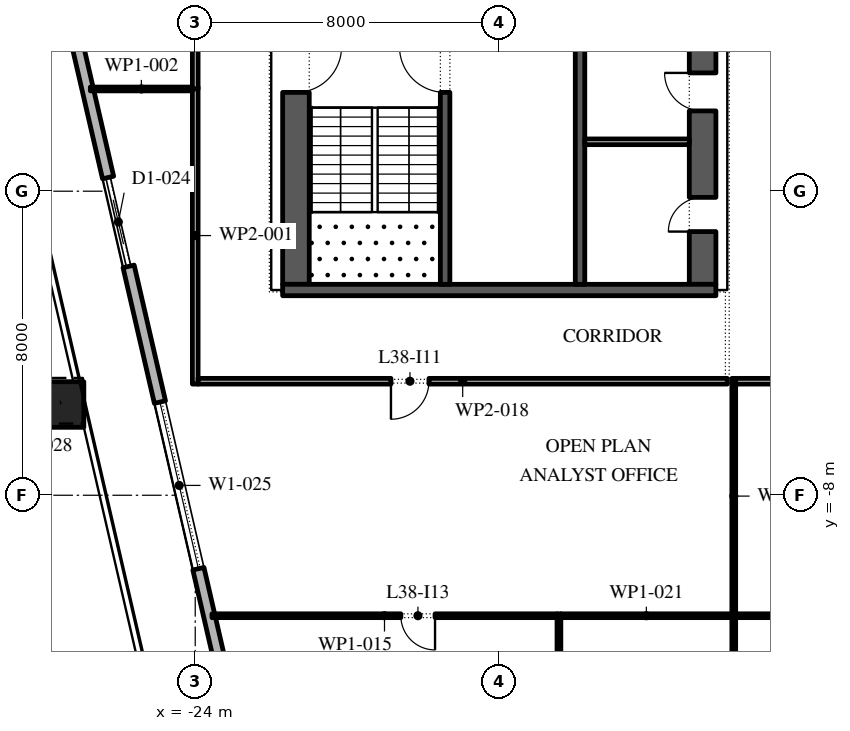
"""IFC4 building model, lengths in metres.
Left out: names, types, materials, properties, quantities, classifications, styles, units other than length and angle.
Written with IfcOpenShell. Run it as: python <this file> out.ifc"""

import sys

from ifc_helpers import new_model, si_unit, direction, frame, frame_2d, origin, origin_2d, place, context, subcontext, project, spatial, rectangle, extrude, element, fill, save


model = new_model("IFC4")
c1 = context("Model", 3, precision=1e-05, world=origin(), true_north=direction((0.0, 1.0)))
c2 = subcontext(c1, "Body", "Model", "MODEL_VIEW")
j1 = project(units=[si_unit("LENGTHUNIT", "METRE"), si_unit("PLANEANGLEUNIT", "RADIAN")], contexts=[c1])
p1 = place(None, origin())
s1 = spatial("IfcSite", under=j1, at=p1, CompositionType="ELEMENT")
p2 = place(p1, origin())
s2 = spatial("IfcBuilding", under=s1, at=p2, CompositionType="ELEMENT")
p3 = place(p2, frame((0.0, 0.0, 175.8)))
s3 = spatial("IfcBuildingStorey", under=s2, at=p3, CompositionType="ELEMENT", Elevation=175.8)
p4 = place(p3, frame((-27.531, -5.613, 0.0), z_axis=(-0.005404472139, 0.023419379268, 0.999711120452), x_axis=(-0.974391195695, -0.224859506699, 0.0)))
e1 = element("IfcColumn", 1, at=p4, inside=s3, PredefinedType="COLUMN", context=c2, shape_type="SweptSolid", body=[
    extrude(rectangle(XDim=1.2, YDim=1.2, at=origin_2d()), origin(), (0.0, 0.0, 1.0), 4.201),
])
p5 = place(p3, frame((-17.592, -20.657, 0.0), z_axis=(0.0, 0.0, 1.0), x_axis=(0.974370243697, 0.224950279389, 0.0)))
e2 = element("IfcWall", 2, at=p5, inside=s3, PredefinedType="STANDARD", context=c2, shape_type="SweptSolid", body=[
    extrude(rectangle(XDim=49.5, YDim=0.3, at=frame_2d((24.75, 0.0))), origin(), (0.0, 0.0, 1.0), 4.0),
])
p6 = place(p5, frame((3.6, 0.0, 0.0)))
e3 = element("IfcOpeningElement", 3, at=p6, cuts=e2, PredefinedType="OPENING", context=c2, shape_type="SweptSolid", body=[
    extrude(rectangle(XDim=2.4, YDim=3.5, at=frame_2d((1.2, 1.75))), frame((0.0, 0.16, 0.0), z_axis=(0.0, -1.0, 0.0), x_axis=(1.0, 0.0, 0.0)), (0.0, 0.0, 1.0), 0.32),
])
p7 = place(p5, frame((9.9, 0.0, 0.45)))
e4 = element("IfcOpeningElement", 4, at=p7, cuts=e2, PredefinedType="OPENING", context=c2, shape_type="SweptSolid", body=[
    extrude(rectangle(XDim=4.5, YDim=2.575, at=frame_2d((2.25, 1.288))), frame((0.0, 0.16, 0.0), z_axis=(0.0, -1.0, 0.0), x_axis=(1.0, 0.0, 0.0)), (0.0, 0.0, 1.0), 0.32),
])
p8 = place(p5, frame((18.2, 0.0, 0.45)))
e5 = element("IfcOpeningElement", 5, at=p8, cuts=e2, PredefinedType="OPENING", context=c2, shape_type="SweptSolid", body=[
    extrude(rectangle(XDim=4.5, YDim=3.05, at=frame_2d((2.25, 1.525))), frame((0.0, 0.16, 0.0), z_axis=(0.0, -1.0, 0.0), x_axis=(1.0, 0.0, 0.0)), (0.0, 0.0, 1.0), 0.32),
])
p9 = place(p5, frame((26.5, 0.0, 0.45)))
e6 = element("IfcOpeningElement", 6, at=p9, cuts=e2, PredefinedType="OPENING", context=c2, shape_type="SweptSolid", body=[
    extrude(rectangle(XDim=4.5, YDim=2.75, at=frame_2d((2.25, 1.375))), frame((0.0, 0.16, 0.0), z_axis=(0.0, -1.0, 0.0), x_axis=(1.0, 0.0, 0.0)), (0.0, 0.0, 1.0), 0.32),
])
p10 = place(p5, frame((36.8, 0.0, 0.0)))
e7 = element("IfcOpeningElement", 7, at=p10, cuts=e2, PredefinedType="OPENING", context=c2, shape_type="SweptSolid", body=[
    extrude(rectangle(XDim=2.4, YDim=3.275, at=frame_2d((1.2, 1.637))), frame((0.0, 0.16, 0.0), z_axis=(0.0, -1.0, 0.0), x_axis=(1.0, 0.0, 0.0)), (0.0, 0.0, 1.0), 0.32),
])
p11 = place(p5, frame((43.1, 0.0, 0.45)))
e8 = element("IfcOpeningElement", 8, at=p11, cuts=e2, PredefinedType="OPENING", context=c2, shape_type="SweptSolid", body=[
    extrude(rectangle(XDim=4.5, YDim=2.875, at=frame_2d((2.25, 1.438))), frame((0.0, 0.16, 0.0), z_axis=(0.0, -1.0, 0.0), x_axis=(1.0, 0.0, 0.0)), (0.0, 0.0, 1.0), 0.32),
])
p12 = place(p3, frame((-33.157, 30.092, 0.0), z_axis=(0.0, 0.0, 1.0), x_axis=(0.224950279389, -0.974370243697, 0.0)))
e9 = element("IfcWall", 9, at=p12, inside=s3, PredefinedType="STANDARD", context=c2, shape_type="SweptSolid", body=[
    extrude(rectangle(XDim=49.5, YDim=0.3, at=frame_2d((24.75, 0.0))), origin(), (0.0, 0.0, 1.0), 4.0),
])
p13 = place(p12, frame((2.207, 0.0, 0.0)))
e10 = element("IfcOpeningElement", 10, at=p13, cuts=e9, PredefinedType="OPENING", context=c2, shape_type="SweptSolid", body=[
    extrude(rectangle(XDim=2.4, YDim=3.5, at=frame_2d((1.2, 1.75))), frame((0.0, 0.16, 0.0), z_axis=(0.0, -1.0, 0.0), x_axis=(1.0, 0.0, 0.0)), (0.0, 0.0, 1.0), 0.32),
])
p14 = place(p12, frame((8.121, 0.0, 0.45)))
e11 = element("IfcOpeningElement", 11, at=p14, cuts=e9, PredefinedType="OPENING", context=c2, shape_type="SweptSolid", body=[
    extrude(rectangle(XDim=4.5, YDim=2.825, at=frame_2d((2.25, 1.413))), frame((0.0, 0.16, 0.0), z_axis=(0.0, -1.0, 0.0), x_axis=(1.0, 0.0, 0.0)), (0.0, 0.0, 1.0), 0.32),
])
p15 = place(p12, frame((15.236, 0.0, 0.45)))
e12 = element("IfcOpeningElement", 12, at=p15, cuts=e9, PredefinedType="OPENING", context=c2, shape_type="SweptSolid", body=[
    extrude(rectangle(XDim=4.5, YDim=2.95, at=frame_2d((2.25, 1.475))), frame((0.0, 0.16, 0.0), z_axis=(0.0, -1.0, 0.0), x_axis=(1.0, 0.0, 0.0)), (0.0, 0.0, 1.0), 0.32),
])
p16 = place(p12, frame((22.35, 0.0, 0.45)))
e13 = element("IfcOpeningElement", 13, at=p16, cuts=e9, PredefinedType="OPENING", context=c2, shape_type="SweptSolid", body=[
    extrude(rectangle(XDim=4.5, YDim=3.0, at=frame_2d((2.25, 1.5))), frame((0.0, 0.16, 0.0), z_axis=(0.0, -1.0, 0.0), x_axis=(1.0, 0.0, 0.0)), (0.0, 0.0, 1.0), 0.32),
])
p17 = place(p12, frame((30.514, 0.0, 0.0)))
e14 = element("IfcOpeningElement", 14, at=p17, cuts=e9, PredefinedType="OPENING", context=c2, shape_type="SweptSolid", body=[
    extrude(rectangle(XDim=2.4, YDim=3.5, at=frame_2d((1.2, 1.75))), frame((0.0, 0.16, 0.0), z_axis=(0.0, -1.0, 0.0), x_axis=(1.0, 0.0, 0.0)), (0.0, 0.0, 1.0), 0.32),
])
p18 = place(p12, frame((36.579, 0.0, 0.45)))
e15 = element("IfcOpeningElement", 15, at=p18, cuts=e9, PredefinedType="OPENING", context=c2, shape_type="SweptSolid", body=[
    extrude(rectangle(XDim=4.5, YDim=3.05, at=frame_2d((2.25, 1.525))), frame((0.0, 0.16, 0.0), z_axis=(0.0, -1.0, 0.0), x_axis=(1.0, 0.0, 0.0)), (0.0, 0.0, 1.0), 0.32),
])
p19 = place(p12, frame((43.693, 0.0, 0.45)))
e16 = element("IfcOpeningElement", 16, at=p19, cuts=e9, PredefinedType="OPENING", context=c2, shape_type="SweptSolid", body=[
    extrude(rectangle(XDim=4.5, YDim=3.05, at=frame_2d((2.25, 1.525))), frame((0.0, 0.16, 0.0), z_axis=(0.0, -1.0, 0.0), x_axis=(1.0, 0.0, 0.0)), (0.0, 0.0, 1.0), 0.32),
])
p20 = place(p3, frame((-21.35, -2.45, 0.0), z_axis=(0.0, 0.0, 1.0), x_axis=(0.0, 1.0, 0.0)))
e17 = element("IfcWall", 17, at=p20, inside=s3, PredefinedType="SHEAR", context=c2, shape_type="SweptSolid", body=[
    extrude(rectangle(XDim=27.9, YDim=0.7, at=frame_2d((13.95, 0.0))), origin(), (0.0, 0.0, 1.0), 4.0),
])
p21 = place(p20, frame((5.05, 0.0, 0.0)))
e18 = element("IfcOpeningElement", 18, at=p21, cuts=e17, PredefinedType="OPENING", context=c2, shape_type="SweptSolid", body=[
    extrude(rectangle(XDim=1.2, YDim=2.1, at=frame_2d((0.6, 1.05))), frame((0.0, 0.36, 0.0), z_axis=(0.0, -1.0, 0.0), x_axis=(1.0, 0.0, 0.0)), (0.0, 0.0, 1.0), 0.72),
])
p22 = place(p20, frame((21.65, 0.0, 0.0)))
e19 = element("IfcOpeningElement", 19, at=p22, cuts=e17, PredefinedType="OPENING", context=c2, shape_type="SweptSolid", body=[
    extrude(rectangle(XDim=1.2, YDim=2.1, at=frame_2d((0.6, 1.05))), frame((0.0, 0.36, 0.0), z_axis=(0.0, -1.0, 0.0), x_axis=(1.0, 0.0, 0.0)), (0.0, 0.0, 1.0), 0.72),
])
p23 = place(p3, frame((-10.65, -2.45, 0.0), z_axis=(0.0, 0.0, 1.0), x_axis=(0.0, 1.0, 0.0)))
e20 = element("IfcWall", 20, at=p23, inside=s3, PredefinedType="SHEAR", context=c2, shape_type="SweptSolid", body=[
    extrude(rectangle(XDim=27.9, YDim=0.7, at=frame_2d((13.95, 0.0))), origin(), (0.0, 0.0, 1.0), 4.0),
])
p24 = place(p23, frame((23.65, 0.0, 0.0)))
e21 = element("IfcOpeningElement", 21, at=p24, cuts=e20, PredefinedType="OPENING", context=c2, shape_type="SweptSolid", body=[
    extrude(rectangle(XDim=2.4, YDim=2.1, at=frame_2d((1.2, 1.05))), frame((0.0, 0.36, 0.0), z_axis=(0.0, -1.0, 0.0), x_axis=(1.0, 0.0, 0.0)), (0.0, 0.0, 1.0), 0.72),
])
p25 = place(p23, frame((1.387, 0.0, 0.0)))
e22 = element("IfcOpeningElement", 22, at=p25, cuts=e20, PredefinedType="OPENING", context=c2, shape_type="SweptSolid", body=[
    extrude(rectangle(XDim=0.9, YDim=2.1, at=frame_2d((0.45, 1.05))), frame((0.0, 0.36, 0.0), z_axis=(0.0, -1.0, 0.0), x_axis=(1.0, 0.0, 0.0)), (0.0, 0.0, 1.0), 0.72),
])
p26 = place(p23, frame((4.562, 0.0, 0.0)))
e23 = element("IfcOpeningElement", 23, at=p26, cuts=e20, PredefinedType="OPENING", context=c2, shape_type="SweptSolid", body=[
    extrude(rectangle(XDim=1.0, YDim=2.1, at=frame_2d((0.5, 1.05))), frame((0.0, 0.36, 0.0), z_axis=(0.0, -1.0, 0.0), x_axis=(1.0, 0.0, 0.0)), (0.0, 0.0, 1.0), 0.72),
])
p27 = place(p3, frame((-21.7, -2.6, 0.0), z_axis=(0.0, 0.0, 1.0), x_axis=(1.0, 0.0, 0.0)))
e24 = element("IfcWall", 24, at=p27, inside=s3, PredefinedType="SHEAR", context=c2, shape_type="SweptSolid", body=[
    extrude(rectangle(XDim=11.4, YDim=0.3, at=frame_2d((5.7, 0.0))), origin(), (0.0, 0.0, 1.0), 4.0),
])
p28 = place(p3, frame((-17.425, -2.45, 0.0), z_axis=(0.0, 0.0, 1.0), x_axis=(0.0, 1.0, 0.0)))
e25 = element("IfcWall", 25, at=p28, inside=s3, PredefinedType="SHEAR", context=c2, shape_type="SweptSolid", body=[
    extrude(rectangle(XDim=6.3, YDim=0.25, at=frame_2d((3.15, 0.0))), origin(), (0.0, 0.0, 1.0), 4.0),
])
p29 = place(p28, frame((5.05, 0.0, 0.0)))
e26 = element("IfcOpeningElement", 26, at=p29, cuts=e25, PredefinedType="OPENING", context=c2, shape_type="SweptSolid", body=[
    extrude(rectangle(XDim=1.2, YDim=2.1, at=frame_2d((0.6, 1.05))), frame((0.0, 0.135, 0.0), z_axis=(0.0, -1.0, 0.0), x_axis=(1.0, 0.0, 0.0)), (0.0, 0.0, 1.0), 0.27),
])
p30 = place(p3, frame((-13.875, -2.45, 0.0), z_axis=(0.0, 0.0, 1.0), x_axis=(0.0, 1.0, 0.0)))
e27 = element("IfcWall", 27, at=p30, inside=s3, PredefinedType="SHEAR", context=c2, shape_type="SweptSolid", body=[
    extrude(rectangle(XDim=21.3, YDim=0.25, at=frame_2d((10.65, 0.0))), origin(), (0.0, 0.0, 1.0), 4.0),
])
p31 = place(p30, frame((17.786, 0.0, 0.0)))
e28 = element("IfcOpeningElement", 28, at=p31, cuts=e27, PredefinedType="OPENING", context=c2, shape_type="SweptSolid", body=[
    extrude(rectangle(XDim=0.9, YDim=2.1, at=frame_2d((0.45, 1.05))), frame((0.0, 0.135, 0.0), z_axis=(0.0, -1.0, 0.0), x_axis=(1.0, 0.0, 0.0)), (0.0, 0.0, 1.0), 0.27),
])
p32 = place(p30, frame((6.971, 0.0, 0.0)))
e29 = element("IfcOpeningElement", 29, at=p32, cuts=e27, PredefinedType="OPENING", context=c2, shape_type="SweptSolid", body=[
    extrude(rectangle(XDim=1.1, YDim=2.1, at=frame_2d((0.55, 1.05))), frame((0.0, 0.135, 0.0), z_axis=(0.0, -1.0, 0.0), x_axis=(1.0, 0.0, 0.0)), (0.0, 0.0, 1.0), 0.27),
])
p33 = place(p30, frame((9.114, 0.0, 0.0)))
e30 = element("IfcOpeningElement", 30, at=p33, cuts=e27, PredefinedType="OPENING", context=c2, shape_type="SweptSolid", body=[
    extrude(rectangle(XDim=1.1, YDim=2.1, at=frame_2d((0.55, 1.05))), frame((0.0, 0.135, 0.0), z_axis=(0.0, -1.0, 0.0), x_axis=(1.0, 0.0, 0.0)), (0.0, 0.0, 1.0), 0.27),
])
p34 = place(p30, frame((11.257, 0.0, 0.0)))
e31 = element("IfcOpeningElement", 31, at=p34, cuts=e27, PredefinedType="OPENING", context=c2, shape_type="SweptSolid", body=[
    extrude(rectangle(XDim=1.1, YDim=2.1, at=frame_2d((0.55, 1.05))), frame((0.0, 0.135, 0.0), z_axis=(0.0, -1.0, 0.0), x_axis=(1.0, 0.0, 0.0)), (0.0, 0.0, 1.0), 0.27),
])
p35 = place(p30, frame((13.4, 0.0, 0.0)))
e32 = element("IfcOpeningElement", 32, at=p35, cuts=e27, PredefinedType="OPENING", context=c2, shape_type="SweptSolid", body=[
    extrude(rectangle(XDim=1.1, YDim=2.1, at=frame_2d((0.55, 1.05))), frame((0.0, 0.135, 0.0), z_axis=(0.0, -1.0, 0.0), x_axis=(1.0, 0.0, 0.0)), (0.0, 0.0, 1.0), 0.27),
])
p36 = place(p3, frame((-13.75, 1.3, 0.0), z_axis=(0.0, 0.0, 1.0), x_axis=(1.0, 0.0, 0.0)))
e33 = element("IfcWall", 33, at=p36, inside=s3, PredefinedType="PARTITIONING", context=c2, shape_type="SweptSolid", body=[
    extrude(rectangle(XDim=2.75, YDim=0.15, at=frame_2d((1.375, 0.0))), origin(), (0.0, 0.0, 1.0), 4.0),
])
p37 = place(p3, frame((-24.0, -5.075, 0.0), z_axis=(0.0, 0.0, 1.0), x_axis=(0.0, 1.0, 0.0)))
e34 = element("IfcWall", 34, at=p37, inside=s3, PredefinedType="PARTITIONING", context=c2, shape_type="SweptSolid", body=[
    extrude(rectangle(XDim=7.815, YDim=0.15, at=frame_2d((3.907, 0.0))), origin(), (0.0, 0.0, 1.0), 4.0),
])
p38 = place(p3, frame((-24.075, 2.69, 0.0), z_axis=(0.0, 0.0, 1.0), x_axis=(-1.0, 0.0, 0.0)))
e35 = element("IfcWall", 35, at=p38, inside=s3, PredefinedType="PARTITIONING", context=c2, shape_type="SweptSolid", body=[
    extrude(rectangle(XDim=2.685, YDim=0.1, at=frame_2d((1.343, 0.0))), origin(), (0.0, 0.0, 1.0), 4.0),
])
p39 = place(p3, frame((-24.0, 2.69, 0.0), z_axis=(0.0, 0.0, 1.0), x_axis=(0.0, 1.0, 0.0)))
e36 = element("IfcWall", 36, at=p39, inside=s3, PredefinedType="PARTITIONING", context=c2, shape_type="SweptSolid", body=[
    extrude(rectangle(XDim=12.74, YDim=0.15, at=frame_2d((6.37, 0.0))), origin(), (0.0, 0.0, 1.0), 4.0),
])
p40 = place(p39, frame((5.79, 0.0, 0.0)))
e37 = element("IfcOpeningElement", 37, at=p40, cuts=e36, PredefinedType="OPENING", context=c2, shape_type="SweptSolid", body=[
    extrude(rectangle(XDim=1.0, YDim=2.1, at=frame_2d((0.5, 1.05))), frame((0.0, 0.085, 0.0), z_axis=(0.0, -1.0, 0.0), x_axis=(1.0, 0.0, 0.0)), (0.0, 0.0, 1.0), 0.17),
])
p41 = place(p3, frame((-14.43, -19.856, 0.0), z_axis=(0.0, 0.0, 1.0), x_axis=(0.0, 1.0, 0.0)))
e38 = element("IfcWall", 38, at=p41, inside=s3, PredefinedType="PARTITIONING", context=c2, shape_type="SweptSolid", body=[
    extrude(rectangle(XDim=8.736, YDim=0.1, at=frame_2d((4.368, 0.0))), origin(), (0.0, 0.0, 1.0), 4.0),
])
p42 = place(p3, frame((-14.48, -11.17, 0.0), z_axis=(0.0, 0.0, 1.0), x_axis=(-1.0, 0.0, 0.0)))
e39 = element("IfcWall", 39, at=p42, inside=s3, PredefinedType="PARTITIONING", context=c2, shape_type="SweptSolid", body=[
    extrude(rectangle(XDim=9.08, YDim=0.1, at=frame_2d((4.54, 0.0))), origin(), (0.0, 0.0, 1.0), 4.0),
])
p43 = place(p42, frame((3.21, 0.0, 0.0)))
e40 = element("IfcOpeningElement", 40, at=p43, cuts=e39, PredefinedType="OPENING", context=c2, shape_type="SweptSolid", body=[
    extrude(rectangle(XDim=0.9, YDim=2.1, at=frame_2d((0.45, 1.05))), frame((0.0, 0.06, 0.0), z_axis=(0.0, -1.0, 0.0), x_axis=(1.0, 0.0, 0.0)), (0.0, 0.0, 1.0), 0.12),
])
p44 = place(p3, frame((-10.0, -5.0, 0.0), z_axis=(0.0, 0.0, 1.0), x_axis=(-1.0, 0.0, 0.0)))
e41 = element("IfcWall", 41, at=p44, inside=s3, PredefinedType="PARTITIONING", context=c2, shape_type="SweptSolid", body=[
    extrude(rectangle(XDim=13.925, YDim=0.15, at=frame_2d((6.962, 0.0))), origin(), (0.0, 0.0, 1.0), 4.0),
])
p45 = place(p44, frame((7.85, 0.0, 0.0)))
e42 = element("IfcOpeningElement", 42, at=p45, cuts=e41, PredefinedType="OPENING", context=c2, shape_type="SweptSolid", body=[
    extrude(rectangle(XDim=1.0, YDim=2.1, at=frame_2d((0.5, 1.05))), frame((0.0, 0.085, 0.0), z_axis=(0.0, -1.0, 0.0), x_axis=(1.0, 0.0, 0.0)), (0.0, 0.0, 1.0), 0.17),
])
p46 = place(p3, frame((-9.83, -18.794, 0.0), z_axis=(0.0, 0.0, 1.0), x_axis=(0.0, 1.0, 0.0)))
e43 = element("IfcWall", 43, at=p46, inside=s3, PredefinedType="PARTITIONING", context=c2, shape_type="SweptSolid", body=[
    extrude(rectangle(XDim=7.674, YDim=0.1, at=frame_2d((3.837, 0.0))), origin(), (0.0, 0.0, 1.0), 4.0),
])
p47 = place(p46, frame((3.274, 0.0, 0.0)))
e44 = element("IfcOpeningElement", 44, at=p47, cuts=e43, PredefinedType="OPENING", context=c2, shape_type="SweptSolid", body=[
    extrude(rectangle(XDim=0.9, YDim=2.1, at=frame_2d((0.45, 1.05))), frame((0.0, 0.06, 0.0), z_axis=(0.0, -1.0, 0.0), x_axis=(1.0, 0.0, 0.0)), (0.0, 0.0, 1.0), 0.12),
])
p48 = place(p3, frame((-9.88, -11.17, 0.0), z_axis=(0.0, 0.0, 1.0), x_axis=(-1.0, 0.0, 0.0)))
e45 = element("IfcWall", 45, at=p48, inside=s3, PredefinedType="PARTITIONING", context=c2, shape_type="SweptSolid", body=[
    extrude(rectangle(XDim=4.5, YDim=0.1, at=frame_2d((2.25, 0.0))), origin(), (0.0, 0.0, 1.0), 4.0),
])
p49 = place(p3, frame((-9.83, -11.12, 0.0), z_axis=(0.0, 0.0, 1.0), x_axis=(0.0, 1.0, 0.0)))
e46 = element("IfcWall", 46, at=p49, inside=s3, PredefinedType="PARTITIONING", context=c2, shape_type="SweptSolid", body=[
    extrude(rectangle(XDim=6.195, YDim=0.1, at=frame_2d((3.098, 0.0))), origin(), (0.0, 0.0, 1.0), 4.0),
])
p50 = place(p3, frame((-9.78, -11.17, 0.0), z_axis=(0.0, 0.0, 1.0), x_axis=(1.0, 0.0, 0.0)))
e47 = element("IfcWall", 47, at=p50, inside=s3, PredefinedType="PARTITIONING", context=c2, shape_type="SweptSolid", body=[
    extrude(rectangle(XDim=8.755, YDim=0.1, at=frame_2d((4.377, 0.0))), origin(), (0.0, 0.0, 1.0), 4.0),
])
p51 = place(p3, frame((-1.175, -5.0, 0.0), z_axis=(0.0, 0.0, 1.0), x_axis=(-1.0, 0.0, 0.0)))
e48 = element("IfcWall", 48, at=p51, inside=s3, PredefinedType="PARTITIONING", context=c2, shape_type="SweptSolid", body=[
    extrude(rectangle(XDim=8.605, YDim=0.15, at=frame_2d((4.302, 0.0))), origin(), (0.0, 0.0, 1.0), 4.0),
])
p52 = place(p51, frame((2.005, 0.0, 0.0)))
e49 = element("IfcOpeningElement", 49, at=p52, cuts=e48, PredefinedType="OPENING", context=c2, shape_type="SweptSolid", body=[
    extrude(rectangle(XDim=1.0, YDim=2.1, at=frame_2d((0.5, 1.05))), frame((0.0, 0.085, 0.0), z_axis=(0.0, -1.0, 0.0), x_axis=(1.0, 0.0, 0.0)), (0.0, 0.0, 1.0), 0.17),
])
p53 = place(p17, origin())
e50 = element("IfcDoor", 50, at=p53, inside=s3, OperationType="DOUBLE_DOOR_SLIDING", PredefinedType="DOOR", context=c2, shape_type="SweptSolid", body=[
    extrude(rectangle(XDim=2.4, YDim=3.5, at=frame_2d((1.2, 1.75))), frame((0.0, 0.025, 0.0), z_axis=(0.0, -1.0, 0.0), x_axis=(1.0, 0.0, 0.0)), (0.0, 0.0, 1.0), 0.05),
])
fill(e14, e50)
p54 = place(p18, origin())
e51 = element("IfcWindow", 51, at=p54, inside=s3, PartitioningType="DOUBLE_PANEL_VERTICAL", PredefinedType="WINDOW", context=c2, shape_type="SweptSolid", body=[
    extrude(rectangle(XDim=4.5, YDim=3.05, at=frame_2d((2.25, 1.525))), frame((0.0, 0.03, 0.0), z_axis=(0.0, -1.0, 0.0), x_axis=(1.0, 0.0, 0.0)), (0.0, 0.0, 1.0), 0.06),
])
fill(e15, e51)
p55 = place(p29, origin())
e52 = element("IfcDoor", 52, at=p55, inside=s3, OperationType="SINGLE_SWING_LEFT", PredefinedType="DOOR", context=c2, shape_type="SweptSolid", body=[
    extrude(rectangle(XDim=1.2, YDim=2.1, at=frame_2d((0.6, 1.05))), frame((0.0, 0.025, 0.0), z_axis=(0.0, -1.0, 0.0), x_axis=(1.0, 0.0, 0.0)), (0.0, 0.0, 1.0), 0.05),
])
fill(e26, e52)
p56 = place(p21, frame((1.2, 0.0, 0.0), z_axis=(0.0, 0.0, 1.0), x_axis=(-1.0, 0.0, 0.0)))
e53 = element("IfcDoor", 53, at=p56, inside=s3, OperationType="SINGLE_SWING_RIGHT", PredefinedType="DOOR", context=c2, shape_type="SweptSolid", body=[
    extrude(rectangle(XDim=1.2, YDim=2.1, at=frame_2d((0.6, 1.05))), frame((0.0, 0.025, 0.0), z_axis=(0.0, -1.0, 0.0), x_axis=(1.0, 0.0, 0.0)), (0.0, 0.0, 1.0), 0.05),
])
fill(e18, e53)
p57 = place(p25, origin())
e54 = element("IfcDoor", 54, at=p57, inside=s3, OperationType="SINGLE_SWING_RIGHT", PredefinedType="DOOR", context=c2, shape_type="SweptSolid", body=[
    extrude(rectangle(XDim=0.9, YDim=2.1, at=frame_2d((0.45, 1.05))), frame((0.0, 0.35, 0.0), z_axis=(0.0, -1.0, 0.0), x_axis=(1.0, 0.0, 0.0)), (0.0, 0.0, 1.0), 0.05),
])
fill(e22, e54)
p58 = place(p26, origin())
e55 = element("IfcDoor", 55, at=p58, inside=s3, OperationType="SINGLE_SWING_LEFT", PredefinedType="DOOR", context=c2, shape_type="SweptSolid", body=[
    extrude(rectangle(XDim=1.0, YDim=2.1, at=frame_2d((0.5, 1.05))), frame((0.0, 0.35, 0.0), z_axis=(0.0, -1.0, 0.0), x_axis=(1.0, 0.0, 0.0)), (0.0, 0.0, 1.0), 0.05),
])
fill(e23, e55)
p59 = place(p45, origin())
e56 = element("IfcDoor", 56, at=p59, inside=s3, OperationType="SINGLE_SWING_LEFT", PredefinedType="DOOR", context=c2, shape_type="SweptSolid", body=[
    extrude(rectangle(XDim=1.0, YDim=2.1, at=frame_2d((0.5, 1.05))), frame((0.0, 0.025, 0.0), z_axis=(0.0, -1.0, 0.0), x_axis=(1.0, 0.0, 0.0)), (0.0, 0.0, 1.0), 0.05),
])
fill(e42, e56)
p60 = place(p43, origin())
e57 = element("IfcDoor", 57, at=p60, inside=s3, OperationType="SINGLE_SWING_RIGHT", PredefinedType="DOOR", context=c2, shape_type="SweptSolid", body=[
    extrude(rectangle(XDim=0.9, YDim=2.1, at=frame_2d((0.45, 1.05))), frame((0.0, 0.025, 0.0), z_axis=(0.0, -1.0, 0.0), x_axis=(1.0, 0.0, 0.0)), (0.0, 0.0, 1.0), 0.05),
])
fill(e40, e57)
save(model, sys.argv[1])
